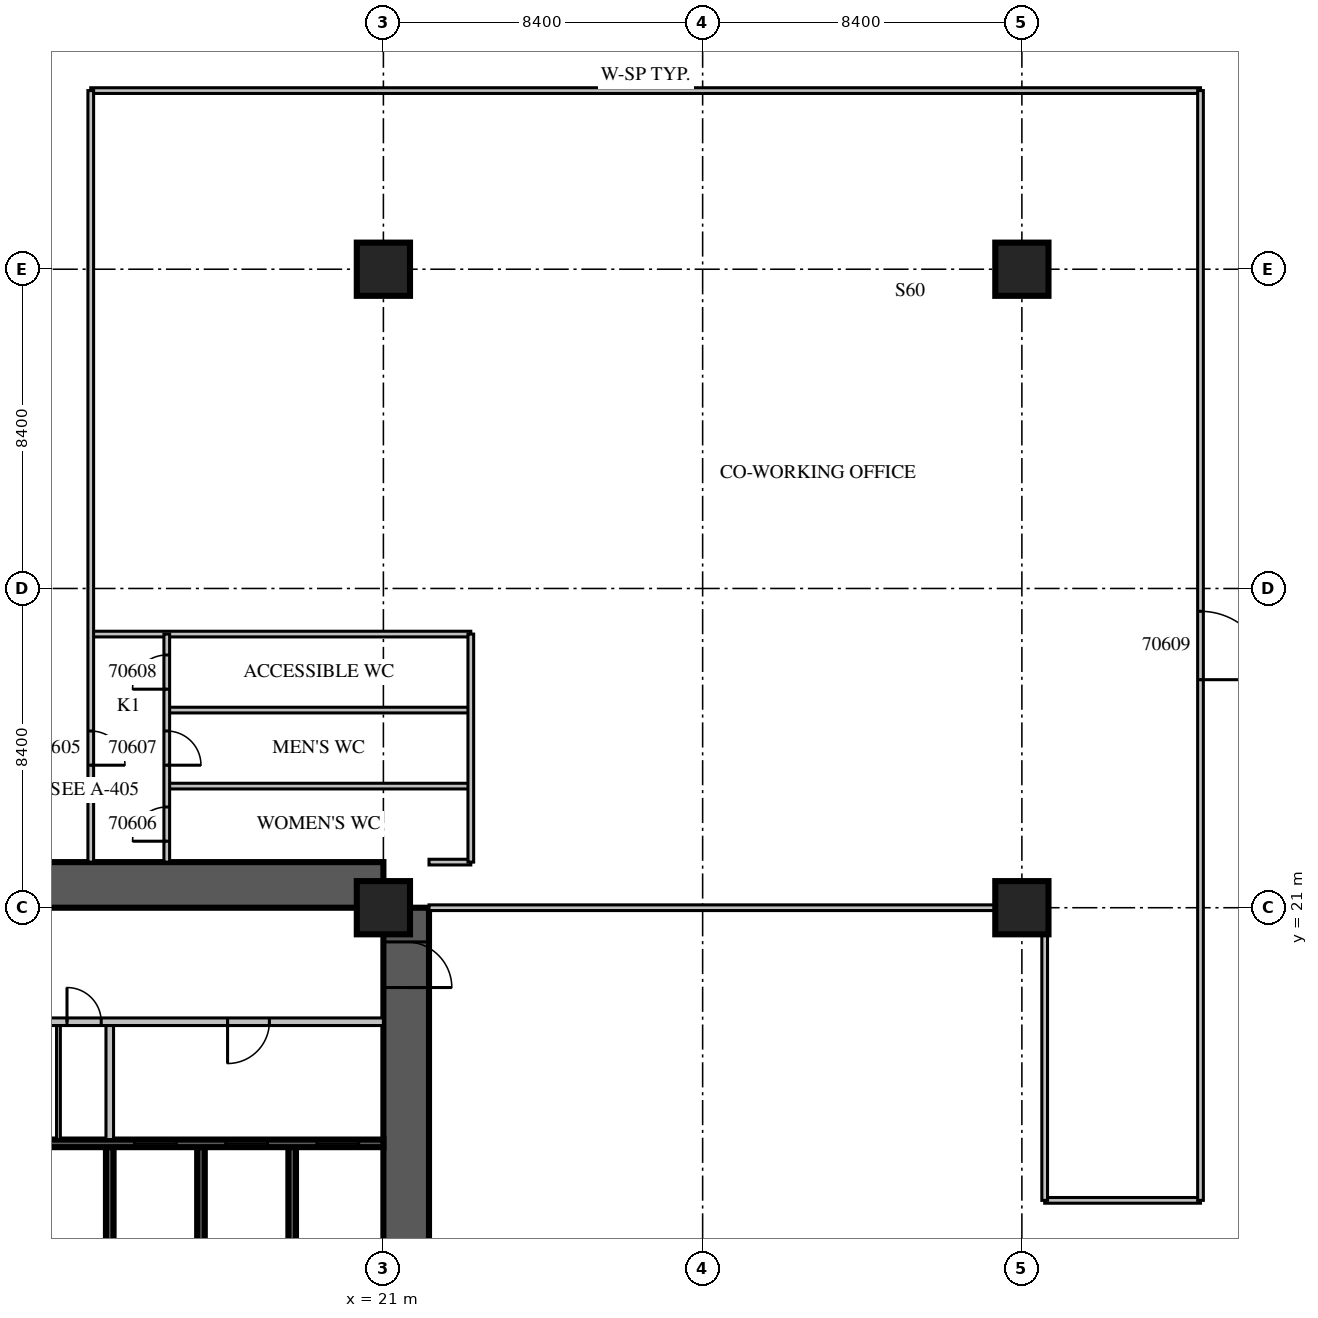
"""IFC4 building model, lengths in metres.
Left out: names, types, materials, properties, quantities, classifications, styles, units other than length and angle.
Written with IfcOpenShell. Run it as: python <this file> out.ifc"""

import sys

from ifc_helpers import new_model, si_unit, direction, frame, frame_2d, origin, origin_2d, place, context, subcontext, project, spatial, rectangle, extrude, source, transform, mapped, element, fill, save


model = new_model("IFC4")
c1 = context("Model", 3, precision=1e-05, world=origin(), true_north=direction((0.0, 1.0)))
c2 = subcontext(c1, "Body", "Model", "MODEL_VIEW")
j1 = project(units=[si_unit("LENGTHUNIT", "METRE"), si_unit("PLANEANGLEUNIT", "RADIAN")], contexts=[c1])
p1 = place(None, origin())
s1 = spatial("IfcSite", under=j1, at=p1, CompositionType="ELEMENT")
p2 = place(p1, origin())
s2 = spatial("IfcBuilding", under=s1, at=p2, CompositionType="ELEMENT")
p3 = place(p2, frame((0.0, 0.0, 18.3)))
s3 = spatial("IfcBuildingStorey", under=s2, at=p3, CompositionType="ELEMENT", Elevation=18.3)
m1 = source(origin(), c2, "Body", "SweptSolid", [
    extrude(rectangle(XDim=1.4, YDim=1.4, at=origin_2d()), origin(), (0.0, 0.0, 1.0), 5.4),
])
for number, where, z_axis, x_axis in (
    (1, (21.0, 21.0, 0.0), (0.0, 0.0, 1.0), (1.0, 0.0, 0.0)),
    (2, (21.0, 37.8, 0.0), (0.0, 0.0, 1.0), (1.0, 0.0, 0.0)),
    (3, (37.8, 21.0, 0.0), (0.0, 0.0, 1.0), (1.0, 0.0, 0.0)),
    (4, (37.8, 37.8, 0.0), (0.0, 0.0, 1.0), (1.0, 0.0, 0.0)),
):
    element("IfcColumn", number, at=place(p3, frame(where, z_axis=z_axis, x_axis=x_axis)), inside=s3, PredefinedType="COLUMN", context=c2, shape_type="MappedRepresentation", body=[
        mapped(m1, transform((0.0, 0.0, 0.0), scale=1.0)),
    ])
m2 = source(origin(), c2, "Body", "SweptSolid", [
    extrude(rectangle(XDim=16.8, YDim=1.2, at=frame_2d((8.4, 0.0))), origin(), (0.0, 0.0, 1.0), 5.4),
])
p4 = place(p3, frame((21.6, 4.2, 0.0), z_axis=(0.0, 0.0, 1.0), x_axis=(0.0, 1.0, 0.0)))
e5 = element("IfcWall", 5, at=p4, inside=s3, PredefinedType="SHEAR", context=c2, shape_type="MappedRepresentation", body=[
    mapped(m2, transform((0.0, 0.0, 0.0), scale=1.0)),
])
m3 = source(origin(), c2, "Body", "SweptSolid", [
    extrude(rectangle(XDim=2.2, YDim=2.1, at=frame_2d((1.1, 1.05))), frame((0.0, 0.61, 0.0), z_axis=(0.0, -1.0, 0.0), x_axis=(1.0, 0.0, 0.0)), (0.0, 0.0, 1.0), 1.22),
])
p5 = place(p4, frame((4.2, 0.0, 0.0)))
e6 = element("IfcOpeningElement", 6, at=p5, cuts=e5, PredefinedType="OPENING", context=c2, shape_type="MappedRepresentation", body=[
    mapped(m3, transform((0.0, 0.0, 0.0), scale=1.0)),
])
m4 = source(origin(), c2, "Body", "SweptSolid", [
    extrude(rectangle(XDim=1.2, YDim=2.1, at=frame_2d((0.6, 1.05))), frame((0.0, 0.61, 0.0), z_axis=(0.0, -1.0, 0.0), x_axis=(1.0, 0.0, 0.0)), (0.0, 0.0, 1.0), 1.22),
])
p6 = place(p4, frame((14.7, 0.0, 0.0)))
e7 = element("IfcOpeningElement", 7, at=p6, cuts=e5, PredefinedType="OPENING", context=c2, shape_type="MappedRepresentation", body=[
    mapped(m4, transform((0.0, 0.0, 0.0), scale=1.0)),
])
p7 = place(p3, frame((4.2, 21.6, 0.0), z_axis=(0.0, 0.0, 1.0), x_axis=(1.0, 0.0, 0.0)))
e8 = element("IfcWall", 8, at=p7, inside=s3, PredefinedType="SHEAR", context=c2, shape_type="MappedRepresentation", body=[
    mapped(m2, transform((0.0, 0.0, 0.0), scale=1.0)),
])
p8 = place(p7, frame((6.2, 0.0, 0.0)))
e9 = element("IfcOpeningElement", 9, at=p8, cuts=e8, PredefinedType="OPENING", context=c2, shape_type="MappedRepresentation", body=[
    mapped(m4, transform((0.0, 0.0, 0.0), scale=1.0)),
])
m5 = source(origin(), c2, "Body", "SweptSolid", [
    extrude(rectangle(XDim=3.0, YDim=0.2, at=frame_2d((1.5, 0.0))), origin(), (0.0, 0.0, 1.0), 5.4),
])
for number, where, z_axis, x_axis in (
    (10, (13.8, 11.7, 0.0), (0.0, 0.0, 1.0), (0.0, 1.0, 0.0)),
    (11, (16.2, 11.7, 0.0), (0.0, 0.0, 1.0), (0.0, 1.0, 0.0)),
    (12, (18.6, 11.7, 0.0), (0.0, 0.0, 1.0), (0.0, 1.0, 0.0)),
):
    element("IfcWall", number, at=place(p3, frame(where, z_axis=z_axis, x_axis=x_axis)), inside=s3, PredefinedType="SOLIDWALL", context=c2, shape_type="MappedRepresentation", body=[
        mapped(m5, transform((0.0, 0.0, 0.0), scale=1.0)),
    ])
m6 = source(origin(), c2, "Body", "SweptSolid", [
    extrude(rectangle(XDim=16.8, YDim=0.2, at=frame_2d((8.4, 0.0))), origin(), (0.0, 0.0, 1.0), 5.4),
])
p9 = place(p3, frame((4.2, 14.8, 0.0), z_axis=(0.0, 0.0, 1.0), x_axis=(1.0, 0.0, 0.0)))
e13 = element("IfcWall", 13, at=p9, inside=s3, PredefinedType="SOLIDWALL", context=c2, shape_type="MappedRepresentation", body=[
    mapped(m6, transform((0.0, 0.0, 0.0), scale=1.0)),
])
m7 = source(origin(), c2, "Body", "SweptSolid", [
    extrude(rectangle(XDim=1.1, YDim=2.1, at=frame_2d((0.55, 1.05))), frame((0.0, 0.11, 0.0), z_axis=(0.0, -1.0, 0.0), x_axis=(1.0, 0.0, 0.0)), (0.0, 0.0, 1.0), 0.22),
])
p10 = place(p9, frame((10.25, 0.0, 0.0)))
e14 = element("IfcOpeningElement", 14, at=p10, cuts=e13, PredefinedType="OPENING", context=c2, shape_type="MappedRepresentation", body=[
    mapped(m7, transform((0.0, 0.0, 0.0), scale=1.0)),
])
p11 = place(p9, frame((12.65, 0.0, 0.0)))
e15 = element("IfcOpeningElement", 15, at=p11, cuts=e13, PredefinedType="OPENING", context=c2, shape_type="MappedRepresentation", body=[
    mapped(m7, transform((0.0, 0.0, 0.0), scale=1.0)),
])
p12 = place(p9, frame((15.05, 0.0, 0.0)))
e16 = element("IfcOpeningElement", 16, at=p12, cuts=e13, PredefinedType="OPENING", context=c2, shape_type="MappedRepresentation", body=[
    mapped(m7, transform((0.0, 0.0, 0.0), scale=1.0)),
])
m8 = source(origin(), c2, "Body", "SweptSolid", [
    extrude(rectangle(XDim=11.45, YDim=0.2, at=frame_2d((5.725, 0.0))), origin(), (0.0, 0.0, 1.0), 4.8),
])
p13 = place(p3, frame((9.55, 18.0, 0.0), z_axis=(0.0, 0.0, 1.0), x_axis=(1.0, 0.0, 0.0)))
e17 = element("IfcWall", 17, at=p13, inside=s3, PredefinedType="PARTITIONING", context=c2, shape_type="MappedRepresentation", body=[
    mapped(m8, transform((0.0, 0.0, 0.0), scale=1.0)),
])
m9 = source(origin(), c2, "Body", "SweptSolid", [
    extrude(rectangle(XDim=0.9, YDim=2.1, at=frame_2d((0.45, 1.05))), frame((0.0, 0.11, 0.0), z_axis=(0.0, -1.0, 0.0), x_axis=(1.0, 0.0, 0.0)), (0.0, 0.0, 1.0), 0.22),
])
p14 = place(p13, frame((1.075, 0.0, 0.0)))
e18 = element("IfcOpeningElement", 18, at=p14, cuts=e17, PredefinedType="OPENING", context=c2, shape_type="MappedRepresentation", body=[
    mapped(m9, transform((0.0, 0.0, 0.0), scale=1.0)),
])
p15 = place(p13, frame((3.125, 0.0, 0.0)))
e19 = element("IfcOpeningElement", 19, at=p15, cuts=e17, PredefinedType="OPENING", context=c2, shape_type="MappedRepresentation", body=[
    mapped(m9, transform((0.0, 0.0, 0.0), scale=1.0)),
])
p16 = place(p13, frame((7.35, 0.0, 0.0)))
e20 = element("IfcOpeningElement", 20, at=p16, cuts=e17, PredefinedType="OPENING", context=c2, shape_type="MappedRepresentation", body=[
    mapped(m7, transform((0.0, 0.0, 0.0), scale=1.0)),
])
m10 = source(origin(), c2, "Body", "SweptSolid", [
    extrude(rectangle(XDim=3.0, YDim=0.2, at=frame_2d((1.5, 0.0))), origin(), (0.0, 0.0, 1.0), 4.8),
])
p17 = place(p3, frame((13.8, 14.9, 0.0), z_axis=(0.0, 0.0, 1.0), x_axis=(0.0, 1.0, 0.0)))
e21 = element("IfcWall", 21, at=p17, inside=s3, PredefinedType="PARTITIONING", context=c2, shape_type="MappedRepresentation", body=[
    mapped(m10, transform((0.0, 0.0, 0.0), scale=1.0)),
])
m11 = source(origin(), c2, "Body", "SweptSolid", [
    extrude(rectangle(XDim=3.0, YDim=0.1, at=frame_2d((1.5, 0.0))), origin(), (0.0, 0.0, 1.0), 4.8),
])
p18 = place(p3, frame((12.45, 14.9, 0.0), z_axis=(0.0, 0.0, 1.0), x_axis=(0.0, 1.0, 0.0)))
e22 = element("IfcWall", 22, at=p18, inside=s3, PredefinedType="PARTITIONING", context=c2, shape_type="MappedRepresentation", body=[
    mapped(m11, transform((0.0, 0.0, 0.0), scale=1.0)),
])
m12 = source(origin(), c2, "Body", "SweptSolid", [
    extrude(rectangle(XDim=4.1, YDim=0.15, at=frame_2d((2.05, 0.0))), origin(), (0.0, 0.0, 1.0), 4.8),
])
p19 = place(p3, frame((38.4, 13.3, 0.0), z_axis=(0.0, 0.0, 1.0), x_axis=(1.0, 0.0, 0.0)))
e23 = element("IfcWall", 23, at=p19, inside=s3, PredefinedType="PARTITIONING", context=c2, shape_type="MappedRepresentation", body=[
    mapped(m12, transform((0.0, 0.0, 0.0), scale=1.0)),
])
m13 = source(origin(), c2, "Body", "SweptSolid", [
    extrude(rectangle(XDim=16.2, YDim=0.15, at=frame_2d((8.1, 0.0))), origin(), (0.0, 0.0, 1.0), 4.8),
])
p20 = place(p3, frame((22.2, 21.0, 0.0), z_axis=(0.0, 0.0, 1.0), x_axis=(1.0, 0.0, 0.0)))
e24 = element("IfcWall", 24, at=p20, inside=s3, PredefinedType="PARTITIONING", context=c2, shape_type="MappedRepresentation", body=[
    mapped(m13, transform((0.0, 0.0, 0.0), scale=1.0)),
])
m14 = source(origin(), c2, "Body", "SweptSolid", [
    extrude(rectangle(XDim=1.1, YDim=0.15, at=frame_2d((0.55, 0.0))), origin(), (0.0, 0.0, 1.0), 4.8),
])
p21 = place(p3, frame((22.2, 22.2, 0.0), z_axis=(0.0, 0.0, 1.0), x_axis=(1.0, 0.0, 0.0)))
e25 = element("IfcWall", 25, at=p21, inside=s3, PredefinedType="PARTITIONING", context=c2, shape_type="MappedRepresentation", body=[
    mapped(m14, transform((0.0, 0.0, 0.0), scale=1.0)),
])
m15 = source(origin(), c2, "Body", "SweptSolid", [
    extrude(rectangle(XDim=8.0, YDim=0.15, at=frame_2d((4.0, 0.0))), origin(), (0.0, 0.0, 1.0), 4.8),
])
for number, where, z_axis, x_axis in (
    (26, (15.3, 24.2, 0.0), (0.0, 0.0, 1.0), (1.0, 0.0, 0.0)),
    (27, (15.3, 26.2, 0.0), (0.0, 0.0, 1.0), (1.0, 0.0, 0.0)),
):
    element("IfcWall", number, at=place(p3, frame(where, z_axis=z_axis, x_axis=x_axis)), inside=s3, PredefinedType="PARTITIONING", context=c2, shape_type="MappedRepresentation", body=[
        mapped(m15, transform((0.0, 0.0, 0.0), scale=1.0)),
    ])
m16 = source(origin(), c2, "Body", "SweptSolid", [
    extrude(rectangle(XDim=10.0, YDim=0.15, at=frame_2d((5.0, 0.0))), origin(), (0.0, 0.0, 1.0), 4.8),
])
p22 = place(p3, frame((13.3, 28.2, 0.0), z_axis=(0.0, 0.0, 1.0), x_axis=(1.0, 0.0, 0.0)))
e28 = element("IfcWall", 28, at=p22, inside=s3, PredefinedType="PARTITIONING", context=c2, shape_type="MappedRepresentation", body=[
    mapped(m16, transform((0.0, 0.0, 0.0), scale=1.0)),
])
m17 = source(origin(), c2, "Body", "SweptSolid", [
    extrude(rectangle(XDim=29.2, YDim=0.15, at=frame_2d((14.6, 0.0))), origin(), (0.0, 0.0, 1.0), 4.8),
])
p23 = place(p3, frame((13.3, 42.5, 0.0), z_axis=(0.0, 0.0, 1.0), x_axis=(1.0, 0.0, 0.0)))
e29 = element("IfcWall", 29, at=p23, inside=s3, PredefinedType="PARTITIONING", context=c2, shape_type="MappedRepresentation", body=[
    mapped(m17, transform((0.0, 0.0, 0.0), scale=1.0)),
])
m18 = source(origin(), c2, "Body", "SweptSolid", [
    extrude(rectangle(XDim=20.3, YDim=0.15, at=frame_2d((10.15, 0.0))), origin(), (0.0, 0.0, 1.0), 4.8),
])
p24 = place(p3, frame((13.3, 22.2, 0.0), z_axis=(0.0, 0.0, 1.0), x_axis=(0.0, 1.0, 0.0)))
e30 = element("IfcWall", 30, at=p24, inside=s3, PredefinedType="PARTITIONING", context=c2, shape_type="MappedRepresentation", body=[
    mapped(m18, transform((0.0, 0.0, 0.0), scale=1.0)),
])
m19 = source(origin(), c2, "Body", "SweptSolid", [
    extrude(rectangle(XDim=0.9, YDim=2.1, at=frame_2d((0.45, 1.05))), frame((0.0, 0.085, 0.0), z_axis=(0.0, -1.0, 0.0), x_axis=(1.0, 0.0, 0.0)), (0.0, 0.0, 1.0), 0.17),
])
p25 = place(p24, frame((2.55, 0.0, 0.0)))
e31 = element("IfcOpeningElement", 31, at=p25, cuts=e30, PredefinedType="OPENING", context=c2, shape_type="MappedRepresentation", body=[
    mapped(m19, transform((0.0, 0.0, 0.0), scale=1.0)),
])
m20 = source(origin(), c2, "Body", "SweptSolid", [
    extrude(rectangle(XDim=6.0, YDim=0.15, at=frame_2d((3.0, 0.0))), origin(), (0.0, 0.0, 1.0), 4.8),
])
p26 = place(p3, frame((15.3, 22.2, 0.0), z_axis=(0.0, 0.0, 1.0), x_axis=(0.0, 1.0, 0.0)))
e32 = element("IfcWall", 32, at=p26, inside=s3, PredefinedType="PARTITIONING", context=c2, shape_type="MappedRepresentation", body=[
    mapped(m20, transform((0.0, 0.0, 0.0), scale=1.0)),
])
p27 = place(p26, frame((0.55, 0.0, 0.0)))
e33 = element("IfcOpeningElement", 33, at=p27, cuts=e32, PredefinedType="OPENING", context=c2, shape_type="MappedRepresentation", body=[
    mapped(m19, transform((0.0, 0.0, 0.0), scale=1.0)),
])
p28 = place(p26, frame((2.55, 0.0, 0.0)))
e34 = element("IfcOpeningElement", 34, at=p28, cuts=e32, PredefinedType="OPENING", context=c2, shape_type="MappedRepresentation", body=[
    mapped(m19, transform((0.0, 0.0, 0.0), scale=1.0)),
])
p29 = place(p26, frame((4.55, 0.0, 0.0)))
e35 = element("IfcOpeningElement", 35, at=p29, cuts=e32, PredefinedType="OPENING", context=c2, shape_type="MappedRepresentation", body=[
    mapped(m19, transform((0.0, 0.0, 0.0), scale=1.0)),
])
p30 = place(p3, frame((23.3, 22.2, 0.0), z_axis=(0.0, 0.0, 1.0), x_axis=(0.0, 1.0, 0.0)))
e36 = element("IfcWall", 36, at=p30, inside=s3, PredefinedType="PARTITIONING", context=c2, shape_type="MappedRepresentation", body=[
    mapped(m20, transform((0.0, 0.0, 0.0), scale=1.0)),
])
m21 = source(origin(), c2, "Body", "SweptSolid", [
    extrude(rectangle(XDim=7.7, YDim=0.15, at=frame_2d((3.85, 0.0))), origin(), (0.0, 0.0, 1.0), 4.8),
])
p31 = place(p3, frame((38.4, 13.3, 0.0), z_axis=(0.0, 0.0, 1.0), x_axis=(0.0, 1.0, 0.0)))
e37 = element("IfcWall", 37, at=p31, inside=s3, PredefinedType="PARTITIONING", context=c2, shape_type="MappedRepresentation", body=[
    mapped(m21, transform((0.0, 0.0, 0.0), scale=1.0)),
])
p32 = place(p3, frame((42.5, 13.3, 0.0), z_axis=(0.0, 0.0, 1.0), x_axis=(0.0, 1.0, 0.0)))
e38 = element("IfcWall", 38, at=p32, inside=s3, PredefinedType="PARTITIONING", context=c2, shape_type="MappedRepresentation", body=[
    mapped(m17, transform((0.0, 0.0, 0.0), scale=1.0)),
])
m22 = source(origin(), c2, "Body", "SweptSolid", [
    extrude(rectangle(XDim=1.8, YDim=2.1, at=frame_2d((0.9, 1.05))), frame((0.0, 0.085, 0.0), z_axis=(0.0, -1.0, 0.0), x_axis=(1.0, 0.0, 0.0)), (0.0, 0.0, 1.0), 0.17),
])
p33 = place(p32, frame((13.7, 0.0, 0.0)))
e39 = element("IfcOpeningElement", 39, at=p33, cuts=e38, PredefinedType="OPENING", context=c2, shape_type="MappedRepresentation", body=[
    mapped(m22, transform((0.0, 0.0, 0.0), scale=1.0)),
])
m23 = source(origin(), c2, "Body", "SweptSolid", [
    extrude(rectangle(XDim=1.1, YDim=2.1, at=frame_2d((0.55, 1.05))), frame((0.0, 0.025, 0.0), z_axis=(0.0, -1.0, 0.0), x_axis=(1.0, 0.0, 0.0)), (0.0, 0.0, 1.0), 0.05),
])
p34 = place(p10, origin())
e40 = element("IfcDoor", 40, at=p34, inside=s3, OperationType="SLIDING_TO_LEFT", PredefinedType="DOOR", context=c2, shape_type="MappedRepresentation", body=[
    mapped(m23, transform((0.0, 0.0, 0.0), scale=1.0)),
])
fill(e14, e40)
p35 = place(p11, origin())
e41 = element("IfcDoor", 41, at=p35, inside=s3, OperationType="SLIDING_TO_LEFT", PredefinedType="DOOR", context=c2, shape_type="MappedRepresentation", body=[
    mapped(m23, transform((0.0, 0.0, 0.0), scale=1.0)),
])
fill(e15, e41)
p36 = place(p12, origin())
e42 = element("IfcDoor", 42, at=p36, inside=s3, OperationType="SLIDING_TO_LEFT", PredefinedType="DOOR", context=c2, shape_type="MappedRepresentation", body=[
    mapped(m23, transform((0.0, 0.0, 0.0), scale=1.0)),
])
fill(e16, e42)
m24 = source(origin(), c2, "Body", "SweptSolid", [
    extrude(rectangle(XDim=0.9, YDim=2.1, at=frame_2d((0.45, 1.05))), frame((0.0, 0.025, 0.0), z_axis=(0.0, -1.0, 0.0), x_axis=(1.0, 0.0, 0.0)), (0.0, 0.0, 1.0), 0.05),
])
p37 = place(p15, origin())
e43 = element("IfcDoor", 43, at=p37, inside=s3, OperationType="SINGLE_SWING_LEFT", PredefinedType="DOOR", context=c2, shape_type="MappedRepresentation", body=[
    mapped(m24, transform((0.0, 0.0, 0.0), scale=1.0)),
])
fill(e19, e43)
p38 = place(p16, origin())
e44 = element("IfcDoor", 44, at=p38, inside=s3, OperationType="SINGLE_SWING_RIGHT", PredefinedType="DOOR", context=c2, shape_type="MappedRepresentation", body=[
    mapped(m23, transform((0.0, 0.0, 0.0), scale=1.0)),
])
fill(e20, e44)
m25 = source(origin(), c2, "Body", "SweptSolid", [
    extrude(rectangle(XDim=1.2, YDim=2.1, at=frame_2d((0.6, 1.05))), frame((0.0, 0.025, 0.0), z_axis=(0.0, -1.0, 0.0), x_axis=(1.0, 0.0, 0.0)), (0.0, 0.0, 1.0), 0.05),
])
p39 = place(p6, origin())
e45 = element("IfcDoor", 45, at=p39, inside=s3, OperationType="SINGLE_SWING_RIGHT", PredefinedType="DOOR", context=c2, shape_type="MappedRepresentation", body=[
    mapped(m25, transform((0.0, 0.0, 0.0), scale=1.0)),
])
fill(e7, e45)
p40 = place(p25, origin())
e46 = element("IfcDoor", 46, at=p40, inside=s3, OperationType="SINGLE_SWING_RIGHT", PredefinedType="DOOR", context=c2, shape_type="MappedRepresentation", body=[
    mapped(m24, transform((0.0, 0.0, 0.0), scale=1.0)),
])
fill(e31, e46)
p41 = place(p27, origin())
e47 = element("IfcDoor", 47, at=p41, inside=s3, OperationType="SINGLE_SWING_LEFT", PredefinedType="DOOR", context=c2, shape_type="MappedRepresentation", body=[
    mapped(m24, transform((0.0, 0.0, 0.0), scale=1.0)),
])
fill(e33, e47)
p42 = place(p28, origin())
e48 = element("IfcDoor", 48, at=p42, inside=s3, OperationType="SINGLE_SWING_RIGHT", PredefinedType="DOOR", context=c2, shape_type="MappedRepresentation", body=[
    mapped(m24, transform((0.0, 0.0, 0.0), scale=1.0)),
])
fill(e34, e48)
p43 = place(p29, origin())
e49 = element("IfcDoor", 49, at=p43, inside=s3, OperationType="SINGLE_SWING_LEFT", PredefinedType="DOOR", context=c2, shape_type="MappedRepresentation", body=[
    mapped(m24, transform((0.0, 0.0, 0.0), scale=1.0)),
])
fill(e35, e49)
m26 = source(origin(), c2, "Body", "SweptSolid", [
    extrude(rectangle(XDim=1.8, YDim=2.1, at=frame_2d((0.9, 1.05))), frame((0.0, 0.025, 0.0), z_axis=(0.0, -1.0, 0.0), x_axis=(1.0, 0.0, 0.0)), (0.0, 0.0, 1.0), 0.05),
])
p44 = place(p33, origin())
e50 = element("IfcDoor", 50, at=p44, inside=s3, OperationType="DOUBLE_DOOR_SINGLE_SWING", PredefinedType="DOOR", context=c2, shape_type="MappedRepresentation", body=[
    mapped(m26, transform((0.0, 0.0, 0.0), scale=1.0)),
])
fill(e39, e50)
save(model, sys.argv[1])
